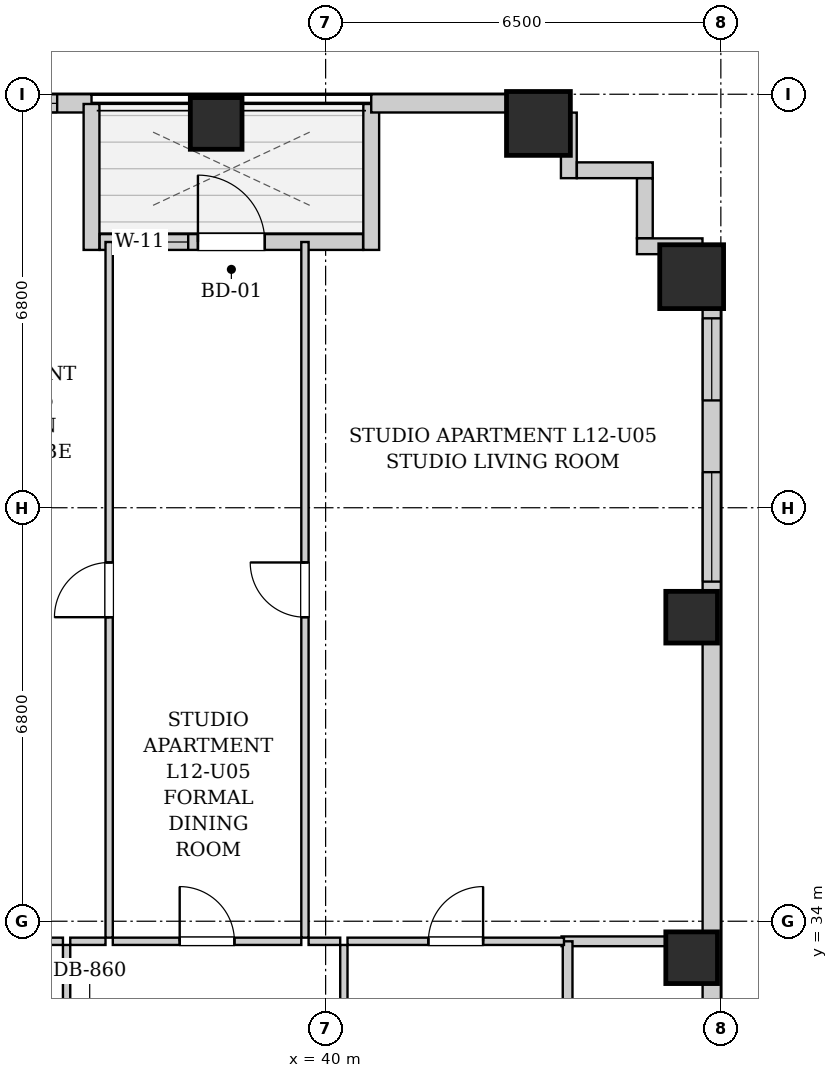
"""IFC4 building model, lengths in metres.
Left out: names, types, materials, properties, quantities, classifications, styles, units other than length and angle.
Written with IfcOpenShell. Run it as: python <this file> out.ifc"""

import sys

from ifc_helpers import new_model, si_unit, direction, frame, frame_2d, origin, origin_2d, place, context, subcontext, project, spatial, rectangle, extrude, element, fill, save


model = new_model("IFC4")
c1 = context("Model", 3, precision=1e-05, world=origin(), true_north=direction((0.0, 1.0)))
c2 = subcontext(c1, "Body", "Model", "MODEL_VIEW")
j1 = project(units=[si_unit("LENGTHUNIT", "METRE"), si_unit("PLANEANGLEUNIT", "RADIAN")], contexts=[c1])
p1 = place(None, origin())
s1 = spatial("IfcSite", under=j1, at=p1, CompositionType="ELEMENT")
p2 = place(p1, origin())
s2 = spatial("IfcBuilding", under=s1, at=p2, CompositionType="ELEMENT")
p3 = place(p2, frame((0.0, 0.0, 48.2)))
s3 = spatial("IfcBuildingStorey", under=s2, at=p3, CompositionType="ELEMENT", Elevation=48.2)
p4 = place(p3, frame((38.2, 47.12, 0.0), z_axis=(0.0, 0.0, 1.0), x_axis=(1.0, 0.0, 0.0)))
e1 = element("IfcColumn", 1, at=p4, inside=s3, PredefinedType="COLUMN", context=c2, shape_type="SweptSolid", body=[
    extrude(rectangle(XDim=0.85, YDim=0.85, at=origin_2d()), origin(), (0.0, 0.0, 1.0), 3.2),
])
p5 = place(p3, frame((43.5, 47.12, 0.0), z_axis=(0.0, 0.0, 1.0), x_axis=(1.0, 0.0, 0.0)))
e2 = element("IfcColumn", 2, at=p5, inside=s3, PredefinedType="COLUMN", context=c2, shape_type="SweptSolid", body=[
    extrude(rectangle(XDim=1.05, YDim=1.05, at=origin_2d()), origin(), (0.0, 0.0, 1.0), 3.2),
])
for number, where, z_axis, x_axis in (
    (3, (46.02, 33.4, 0.0), (0.0, 0.0, 1.0), (1.0, 0.0, 0.0)),
    (4, (46.02, 39.0, 0.0), (0.0, 0.0, 1.0), (1.0, 0.0, 0.0)),
):
    element("IfcColumn", number, at=place(p3, frame(where, z_axis=z_axis, x_axis=x_axis)), inside=s3, PredefinedType="COLUMN", context=c2, shape_type="SweptSolid", body=[
        extrude(rectangle(XDim=0.85, YDim=0.85, at=origin_2d()), origin(), (0.0, 0.0, 1.0), 3.2),
    ])
p6 = place(p3, frame((46.02, 44.6, 0.0), z_axis=(0.0, 0.0, 1.0), x_axis=(1.0, 0.0, 0.0)))
e5 = element("IfcColumn", 5, at=p6, inside=s3, PredefinedType="COLUMN", context=c2, shape_type="SweptSolid", body=[
    extrude(rectangle(XDim=1.05, YDim=1.05, at=origin_2d()), origin(), (0.0, 0.0, 1.0), 3.2),
])
p7 = place(p3, frame((10.0, 47.45, 0.0), z_axis=(0.0, 0.0, 1.0), x_axis=(1.0, 0.0, 0.0)))
e6 = element("IfcWall", 6, at=p7, inside=s3, PredefinedType="SOLIDWALL", context=c2, shape_type="SweptSolid", body=[
    extrude(rectangle(XDim=26.15, YDim=0.3, at=frame_2d((13.075, 0.0))), origin(), (0.0, 0.0, 1.0), 1.975),
])
p8 = place(p7, frame((5.862, 0.0, 0.55)))
e7 = element("IfcOpeningElement", 7, at=p8, cuts=e6, PredefinedType="OPENING", context=c2, shape_type="SweptSolid", body=[
    extrude(rectangle(XDim=1.35, YDim=1.2, at=frame_2d((0.675, 0.6))), frame((0.0, 0.16, 0.0), z_axis=(0.0, -1.0, 0.0), x_axis=(1.0, 0.0, 0.0)), (0.0, 0.0, 1.0), 0.32),
])
p9 = place(p7, frame((8.944, 0.0, 0.55)))
e8 = element("IfcOpeningElement", 8, at=p9, cuts=e6, PredefinedType="OPENING", context=c2, shape_type="SweptSolid", body=[
    extrude(rectangle(XDim=1.8, YDim=1.2, at=frame_2d((0.9, 0.6))), frame((0.0, 0.16, 0.0), z_axis=(0.0, -1.0, 0.0), x_axis=(1.0, 0.0, 0.0)), (0.0, 0.0, 1.0), 0.32),
])
p10 = place(p7, frame((18.788, 0.0, 0.55)))
e9 = element("IfcOpeningElement", 9, at=p10, cuts=e6, PredefinedType="OPENING", context=c2, shape_type="SweptSolid", body=[
    extrude(rectangle(XDim=1.8, YDim=1.2, at=frame_2d((0.9, 0.6))), frame((0.0, 0.16, 0.0), z_axis=(0.0, -1.0, 0.0), x_axis=(1.0, 0.0, 0.0)), (0.0, 0.0, 1.0), 0.32),
])
p11 = place(p7, frame((21.265, 0.0, 0.55)))
e10 = element("IfcOpeningElement", 10, at=p11, cuts=e6, PredefinedType="OPENING", context=c2, shape_type="SweptSolid", body=[
    extrude(rectangle(XDim=1.35, YDim=1.2, at=frame_2d((0.675, 0.6))), frame((0.0, 0.16, 0.0), z_axis=(0.0, -1.0, 0.0), x_axis=(1.0, 0.0, 0.0)), (0.0, 0.0, 1.0), 0.32),
])
p12 = place(p7, frame((23.785, 0.0, 0.55)))
e11 = element("IfcOpeningElement", 11, at=p12, cuts=e6, PredefinedType="OPENING", context=c2, shape_type="SweptSolid", body=[
    extrude(rectangle(XDim=1.8, YDim=1.2, at=frame_2d((0.9, 0.6))), frame((0.0, 0.16, 0.0), z_axis=(0.0, -1.0, 0.0), x_axis=(1.0, 0.0, 0.0)), (0.0, 0.0, 1.0), 0.32),
])
p13 = place(p3, frame((36.15, 47.44, 0.0), z_axis=(0.0, 0.0, 1.0), x_axis=(0.0, -1.0, 0.0)))
e12 = element("IfcWall", 12, at=p13, inside=s3, PredefinedType="SOLIDWALL", context=c2, shape_type="SweptSolid", body=[
    extrude(rectangle(XDim=2.4, YDim=0.26, at=frame_2d((1.2, 0.0))), origin(), (0.0, 0.0, 1.0), 2.94),
])
p14 = place(p3, frame((36.284, 45.17, 0.0), z_axis=(0.0, 0.0, 1.0), x_axis=(1.0, 0.0, 0.0)))
e13 = element("IfcWall", 13, at=p14, inside=s3, PredefinedType="SOLIDWALL", context=c2, shape_type="SweptSolid", body=[
    extrude(rectangle(XDim=4.332, YDim=0.26, at=frame_2d((2.166, 0.0))), origin(), (0.0, 0.0, 1.0), 2.94),
])
p15 = place(p14, frame((1.616, 0.0, 0.0)))
e14 = element("IfcOpeningElement", 14, at=p15, cuts=e13, PredefinedType="OPENING", context=c2, shape_type="SweptSolid", body=[
    extrude(rectangle(XDim=1.1, YDim=2.0, at=frame_2d((0.55, 1.0))), frame((0.0, 0.14, 0.0), z_axis=(0.0, -1.0, 0.0), x_axis=(1.0, 0.0, 0.0)), (0.0, 0.0, 1.0), 0.28),
])
p16 = place(p14, frame((0.606, 0.0, 0.55)))
e15 = element("IfcOpeningElement", 15, at=p16, cuts=e13, PredefinedType="OPENING", context=c2, shape_type="SweptSolid", body=[
    extrude(rectangle(XDim=0.85, YDim=1.2, at=frame_2d((0.425, 0.6))), frame((0.0, 0.14, 0.0), z_axis=(0.0, -1.0, 0.0), x_axis=(1.0, 0.0, 0.0)), (0.0, 0.0, 1.0), 0.28),
])
p17 = place(p3, frame((40.75, 45.04, 0.0), z_axis=(0.0, 0.0, 1.0), x_axis=(0.0, 1.0, 0.0)))
e16 = element("IfcWall", 16, at=p17, inside=s3, PredefinedType="SOLIDWALL", context=c2, shape_type="SweptSolid", body=[
    extrude(rectangle(XDim=2.4, YDim=0.26, at=frame_2d((1.2, 0.0))), origin(), (0.0, 0.0, 1.0), 2.94),
])
p18 = place(p3, frame((40.75, 47.45, 0.0), z_axis=(0.0, 0.0, 1.0), x_axis=(1.0, 0.0, 0.0)))
e17 = element("IfcWall", 17, at=p18, inside=s3, PredefinedType="SOLIDWALL", context=c2, shape_type="SweptSolid", body=[
    extrude(rectangle(XDim=3.25, YDim=0.3, at=frame_2d((1.625, 0.0))), origin(), (0.0, 0.0, 1.0), 1.975),
])
p19 = place(p3, frame((46.35, 45.1, 0.0), z_axis=(0.0, 0.0, 1.0), x_axis=(0.0, -1.0, 0.0)))
e18 = element("IfcWall", 18, at=p19, inside=s3, PredefinedType="SOLIDWALL", context=c2, shape_type="SweptSolid", body=[
    extrude(rectangle(XDim=16.9, YDim=0.3, at=frame_2d((8.45, 0.0))), origin(), (0.0, 0.0, 1.0), 1.975),
])
p20 = place(p19, frame((3.715, 0.0, 0.55)))
e19 = element("IfcOpeningElement", 19, at=p20, cuts=e18, PredefinedType="OPENING", context=c2, shape_type="SweptSolid", body=[
    extrude(rectangle(XDim=1.8, YDim=1.2, at=frame_2d((0.9, 0.6))), frame((0.0, 0.16, 0.0), z_axis=(0.0, -1.0, 0.0), x_axis=(1.0, 0.0, 0.0)), (0.0, 0.0, 1.0), 0.32),
])
p21 = place(p19, frame((1.185, 0.0, 0.55)))
e20 = element("IfcOpeningElement", 20, at=p21, cuts=e18, PredefinedType="OPENING", context=c2, shape_type="SweptSolid", body=[
    extrude(rectangle(XDim=1.35, YDim=1.2, at=frame_2d((0.675, 0.6))), frame((0.0, 0.16, 0.0), z_axis=(0.0, -1.0, 0.0), x_axis=(1.0, 0.0, 0.0)), (0.0, 0.0, 1.0), 0.32),
])
p22 = place(p3, frame((44.0, 47.298, 0.0), z_axis=(0.0, 0.0, 1.0), x_axis=(0.0, -1.0, 0.0)))
e21 = element("IfcWall", 21, at=p22, inside=s3, PredefinedType="SOLIDWALL", context=c2, shape_type="SweptSolid", body=[
    extrude(rectangle(XDim=1.078, YDim=0.26, at=frame_2d((0.539, 0.0))), origin(), (0.0, 0.0, 1.0), 2.94),
])
p23 = place(p3, frame((44.132, 46.35, 0.0), z_axis=(0.0, 0.0, 1.0), x_axis=(1.0, 0.0, 0.0)))
e22 = element("IfcWall", 22, at=p23, inside=s3, PredefinedType="SOLIDWALL", context=c2, shape_type="SweptSolid", body=[
    extrude(rectangle(XDim=1.248, YDim=0.26, at=frame_2d((0.624, 0.0))), origin(), (0.0, 0.0, 1.0), 2.94),
])
p24 = place(p3, frame((45.25, 46.218, 0.0), z_axis=(0.0, 0.0, 1.0), x_axis=(0.0, -1.0, 0.0)))
e23 = element("IfcWall", 23, at=p24, inside=s3, PredefinedType="SOLIDWALL", context=c2, shape_type="SweptSolid", body=[
    extrude(rectangle(XDim=0.986, YDim=0.26, at=frame_2d((0.493, 0.0))), origin(), (0.0, 0.0, 1.0), 2.94),
])
p25 = place(p3, frame((45.12, 45.1, 0.0), z_axis=(0.0, 0.0, 1.0), x_axis=(1.0, 0.0, 0.0)))
e24 = element("IfcWall", 24, at=p25, inside=s3, PredefinedType="SOLIDWALL", context=c2, shape_type="SweptSolid", body=[
    extrude(rectangle(XDim=1.078, YDim=0.26, at=frame_2d((0.539, 0.0))), origin(), (0.0, 0.0, 1.0), 2.94),
])
p26 = place(p3, frame((43.88, 33.67, 0.0), z_axis=(0.0, 0.0, 1.0), x_axis=(1.0, 0.0, 0.0)))
e25 = element("IfcWall", 25, at=p26, inside=s3, PredefinedType="PARTITIONING", context=c2, shape_type="SweptSolid", body=[
    extrude(rectangle(XDim=2.34, YDim=0.16, at=frame_2d((1.17, 0.0))), origin(), (0.0, 0.0, 1.0), 2.94),
])
p27 = place(p3, frame((43.98, 30.76, 0.0), z_axis=(0.0, 0.0, 1.0), x_axis=(0.0, 1.0, 0.0)))
e26 = element("IfcWall", 26, at=p27, inside=s3, PredefinedType="PARTITIONING", context=c2, shape_type="SweptSolid", body=[
    extrude(rectangle(XDim=2.91, YDim=0.16, at=frame_2d((1.455, 0.0))), origin(), (0.0, 0.0, 1.0), 2.94),
])
p28 = place(p3, frame((35.74, 30.76, 0.0), z_axis=(0.0, 0.0, 1.0), x_axis=(0.0, 1.0, 0.0)))
e27 = element("IfcWall", 27, at=p28, inside=s3, PredefinedType="PARTITIONING", context=c2, shape_type="SweptSolid", body=[
    extrude(rectangle(XDim=2.85, YDim=0.12, at=frame_2d((1.425, 0.0))), origin(), (0.0, 0.0, 1.0), 2.94),
])
p29 = place(p28, frame((0.995, 0.0, 0.0)))
e28 = element("IfcOpeningElement", 28, at=p29, cuts=e27, PredefinedType="OPENING", context=c2, shape_type="SweptSolid", body=[
    extrude(rectangle(XDim=0.86, YDim=2.05, at=frame_2d((0.43, 1.025))), frame((0.0, 0.07, 0.0), z_axis=(0.0, -1.0, 0.0), x_axis=(1.0, 0.0, 0.0)), (0.0, 0.0, 1.0), 0.14),
])
p30 = place(p3, frame((33.28, 33.67, 0.0), z_axis=(0.0, 0.0, 1.0), x_axis=(1.0, 0.0, 0.0)))
e29 = element("IfcWall", 29, at=p30, inside=s3, PredefinedType="PARTITIONING", context=c2, shape_type="SweptSolid", body=[
    extrude(rectangle(XDim=2.4, YDim=0.12, at=frame_2d((1.2, 0.0))), origin(), (0.0, 0.0, 1.0), 2.94),
])
p31 = place(p3, frame((40.3, 30.76, 0.0), z_axis=(0.0, 0.0, 1.0), x_axis=(0.0, 1.0, 0.0)))
e30 = element("IfcWall", 30, at=p31, inside=s3, PredefinedType="PARTITIONING", context=c2, shape_type="SweptSolid", body=[
    extrude(rectangle(XDim=2.85, YDim=0.12, at=frame_2d((1.425, 0.0))), origin(), (0.0, 0.0, 1.0), 2.94),
])
p32 = place(p31, frame((0.975, 0.0, 0.0)))
e31 = element("IfcOpeningElement", 31, at=p32, cuts=e30, PredefinedType="OPENING", context=c2, shape_type="SweptSolid", body=[
    extrude(rectangle(XDim=0.9, YDim=2.05, at=frame_2d((0.45, 1.025))), frame((0.0, 0.07, 0.0), z_axis=(0.0, -1.0, 0.0), x_axis=(1.0, 0.0, 0.0)), (0.0, 0.0, 1.0), 0.14),
])
p33 = place(p3, frame((35.8, 33.67, 0.0), z_axis=(0.0, 0.0, 1.0), x_axis=(1.0, 0.0, 0.0)))
e32 = element("IfcWall", 32, at=p33, inside=s3, PredefinedType="PARTITIONING", context=c2, shape_type="SweptSolid", body=[
    extrude(rectangle(XDim=0.58, YDim=0.12, at=frame_2d((0.29, 0.0))), origin(), (0.0, 0.0, 1.0), 2.94),
])
p34 = place(p3, frame((36.5, 33.67, 0.0), z_axis=(0.0, 0.0, 1.0), x_axis=(1.0, 0.0, 0.0)))
e33 = element("IfcWall", 33, at=p34, inside=s3, PredefinedType="PARTITIONING", context=c2, shape_type="SweptSolid", body=[
    extrude(rectangle(XDim=3.1, YDim=0.12, at=frame_2d((1.55, 0.0))), origin(), (0.0, 0.0, 1.0), 2.94),
])
p35 = place(p34, frame((1.1, 0.0, 0.0)))
e34 = element("IfcOpeningElement", 34, at=p35, cuts=e33, PredefinedType="OPENING", context=c2, shape_type="SweptSolid", body=[
    extrude(rectangle(XDim=0.9, YDim=2.05, at=frame_2d((0.45, 1.025))), frame((0.0, 0.07, 0.0), z_axis=(0.0, -1.0, 0.0), x_axis=(1.0, 0.0, 0.0)), (0.0, 0.0, 1.0), 0.14),
])
p36 = place(p3, frame((39.72, 33.67, 0.0), z_axis=(0.0, 0.0, 1.0), x_axis=(1.0, 0.0, 0.0)))
e35 = element("IfcWall", 35, at=p36, inside=s3, PredefinedType="PARTITIONING", context=c2, shape_type="SweptSolid", body=[
    extrude(rectangle(XDim=0.52, YDim=0.12, at=frame_2d((0.26, 0.0))), origin(), (0.0, 0.0, 1.0), 2.94),
])
p37 = place(p3, frame((40.36, 33.67, 0.0), z_axis=(0.0, 0.0, 1.0), x_axis=(1.0, 0.0, 0.0)))
e36 = element("IfcWall", 36, at=p37, inside=s3, PredefinedType="PARTITIONING", context=c2, shape_type="SweptSolid", body=[
    extrude(rectangle(XDim=3.56, YDim=0.12, at=frame_2d((1.78, 0.0))), origin(), (0.0, 0.0, 1.0), 2.94),
])
p38 = place(p37, frame((1.33, 0.0, 0.0)))
e37 = element("IfcOpeningElement", 37, at=p38, cuts=e36, PredefinedType="OPENING", context=c2, shape_type="SweptSolid", body=[
    extrude(rectangle(XDim=0.9, YDim=2.05, at=frame_2d((0.45, 1.025))), frame((0.0, 0.07, 0.0), z_axis=(0.0, -1.0, 0.0), x_axis=(1.0, 0.0, 0.0)), (0.0, 0.0, 1.0), 0.14),
])
p39 = place(p3, frame((36.44, 33.73, 0.0), z_axis=(0.0, 0.0, 1.0), x_axis=(0.0, 1.0, 0.0)))
e38 = element("IfcWall", 38, at=p39, inside=s3, PredefinedType="PARTITIONING", context=c2, shape_type="SweptSolid", body=[
    extrude(rectangle(XDim=11.44, YDim=0.12, at=frame_2d((5.72, 0.0))), origin(), (0.0, 0.0, 1.0), 2.94),
])
p40 = place(p39, frame((5.27, 0.0, 0.0)))
e39 = element("IfcOpeningElement", 39, at=p40, cuts=e38, PredefinedType="OPENING", context=c2, shape_type="SweptSolid", body=[
    extrude(rectangle(XDim=0.9, YDim=2.05, at=frame_2d((0.45, 1.025))), frame((0.0, 0.07, 0.0), z_axis=(0.0, -1.0, 0.0), x_axis=(1.0, 0.0, 0.0)), (0.0, 0.0, 1.0), 0.14),
])
p41 = place(p3, frame((39.66, 33.73, 0.0), z_axis=(0.0, 0.0, 1.0), x_axis=(0.0, 1.0, 0.0)))
e40 = element("IfcWall", 40, at=p41, inside=s3, PredefinedType="PARTITIONING", context=c2, shape_type="SweptSolid", body=[
    extrude(rectangle(XDim=11.44, YDim=0.12, at=frame_2d((5.72, 0.0))), origin(), (0.0, 0.0, 1.0), 2.94),
])
p42 = place(p41, frame((5.27, 0.0, 0.0)))
e41 = element("IfcOpeningElement", 41, at=p42, cuts=e40, PredefinedType="OPENING", context=c2, shape_type="SweptSolid", body=[
    extrude(rectangle(XDim=0.9, YDim=2.05, at=frame_2d((0.45, 1.025))), frame((0.0, 0.07, 0.0), z_axis=(0.0, -1.0, 0.0), x_axis=(1.0, 0.0, 0.0)), (0.0, 0.0, 1.0), 0.14),
])
p43 = place(p35, origin())
e42 = element("IfcDoor", 42, at=p43, inside=s3, OperationType="SINGLE_SWING_LEFT", PredefinedType="DOOR", context=c2, shape_type="SweptSolid", body=[
    extrude(rectangle(XDim=0.9, YDim=2.05, at=frame_2d((0.45, 1.025))), frame((0.0, 0.025, 0.0), z_axis=(0.0, -1.0, 0.0), x_axis=(1.0, 0.0, 0.0)), (0.0, 0.0, 1.0), 0.05),
])
fill(e34, e42)
p44 = place(p38, origin())
e43 = element("IfcDoor", 43, at=p44, inside=s3, OperationType="SINGLE_SWING_RIGHT", PredefinedType="DOOR", context=c2, shape_type="SweptSolid", body=[
    extrude(rectangle(XDim=0.9, YDim=2.05, at=frame_2d((0.45, 1.025))), frame((0.0, 0.025, 0.0), z_axis=(0.0, -1.0, 0.0), x_axis=(1.0, 0.0, 0.0)), (0.0, 0.0, 1.0), 0.05),
])
fill(e37, e43)
p45 = place(p40, origin())
e44 = element("IfcDoor", 44, at=p45, inside=s3, OperationType="SINGLE_SWING_LEFT", PredefinedType="DOOR", context=c2, shape_type="SweptSolid", body=[
    extrude(rectangle(XDim=0.9, YDim=2.05, at=frame_2d((0.45, 1.025))), frame((0.0, 0.025, 0.0), z_axis=(0.0, -1.0, 0.0), x_axis=(1.0, 0.0, 0.0)), (0.0, 0.0, 1.0), 0.05),
])
fill(e39, e44)
p46 = place(p42, origin())
e45 = element("IfcDoor", 45, at=p46, inside=s3, OperationType="SINGLE_SWING_RIGHT", PredefinedType="DOOR", context=c2, shape_type="SweptSolid", body=[
    extrude(rectangle(XDim=0.9, YDim=2.05, at=frame_2d((0.45, 1.025))), frame((0.0, 0.025, 0.0), z_axis=(0.0, -1.0, 0.0), x_axis=(1.0, 0.0, 0.0)), (0.0, 0.0, 1.0), 0.05),
])
fill(e41, e45)
p47 = place(p15, origin())
e46 = element("IfcDoor", 46, at=p47, inside=s3, OperationType="SINGLE_SWING_LEFT", PredefinedType="DOOR", context=c2, shape_type="SweptSolid", body=[
    extrude(rectangle(XDim=1.1, YDim=2.0, at=frame_2d((0.55, 1.0))), frame((0.0, 0.025, 0.0), z_axis=(0.0, -1.0, 0.0), x_axis=(1.0, 0.0, 0.0)), (0.0, 0.0, 1.0), 0.05),
])
fill(e14, e46)
p48 = place(p12, origin())
e47 = element("IfcWindow", 47, at=p48, inside=s3, PartitioningType="DOUBLE_PANEL_VERTICAL", PredefinedType="WINDOW", context=c2, shape_type="SweptSolid", body=[
    extrude(rectangle(XDim=1.8, YDim=1.2, at=frame_2d((0.9, 0.6))), frame((0.0, 0.03, 0.0), z_axis=(0.0, -1.0, 0.0), x_axis=(1.0, 0.0, 0.0)), (0.0, 0.0, 1.0), 0.06),
])
fill(e11, e47)
p49 = place(p16, origin())
e48 = element("IfcWindow", 48, at=p49, inside=s3, PartitioningType="SINGLE_PANEL", PredefinedType="WINDOW", context=c2, shape_type="SweptSolid", body=[
    extrude(rectangle(XDim=0.85, YDim=1.2, at=frame_2d((0.425, 0.6))), frame((0.0, 0.03, 0.0), z_axis=(0.0, -1.0, 0.0), x_axis=(1.0, 0.0, 0.0)), (0.0, 0.0, 1.0), 0.06),
])
fill(e15, e48)
p50 = place(p20, origin())
e49 = element("IfcWindow", 49, at=p50, inside=s3, PartitioningType="DOUBLE_PANEL_VERTICAL", PredefinedType="WINDOW", context=c2, shape_type="SweptSolid", body=[
    extrude(rectangle(XDim=1.8, YDim=1.2, at=frame_2d((0.9, 0.6))), frame((0.0, 0.03, 0.0), z_axis=(0.0, -1.0, 0.0), x_axis=(1.0, 0.0, 0.0)), (0.0, 0.0, 1.0), 0.06),
])
fill(e19, e49)
p51 = place(p21, origin())
e50 = element("IfcWindow", 50, at=p51, inside=s3, PartitioningType="SINGLE_PANEL", PredefinedType="WINDOW", context=c2, shape_type="SweptSolid", body=[
    extrude(rectangle(XDim=1.35, YDim=1.2, at=frame_2d((0.675, 0.6))), frame((0.0, 0.03, 0.0), z_axis=(0.0, -1.0, 0.0), x_axis=(1.0, 0.0, 0.0)), (0.0, 0.0, 1.0), 0.06),
])
fill(e20, e50)
save(model, sys.argv[1])
